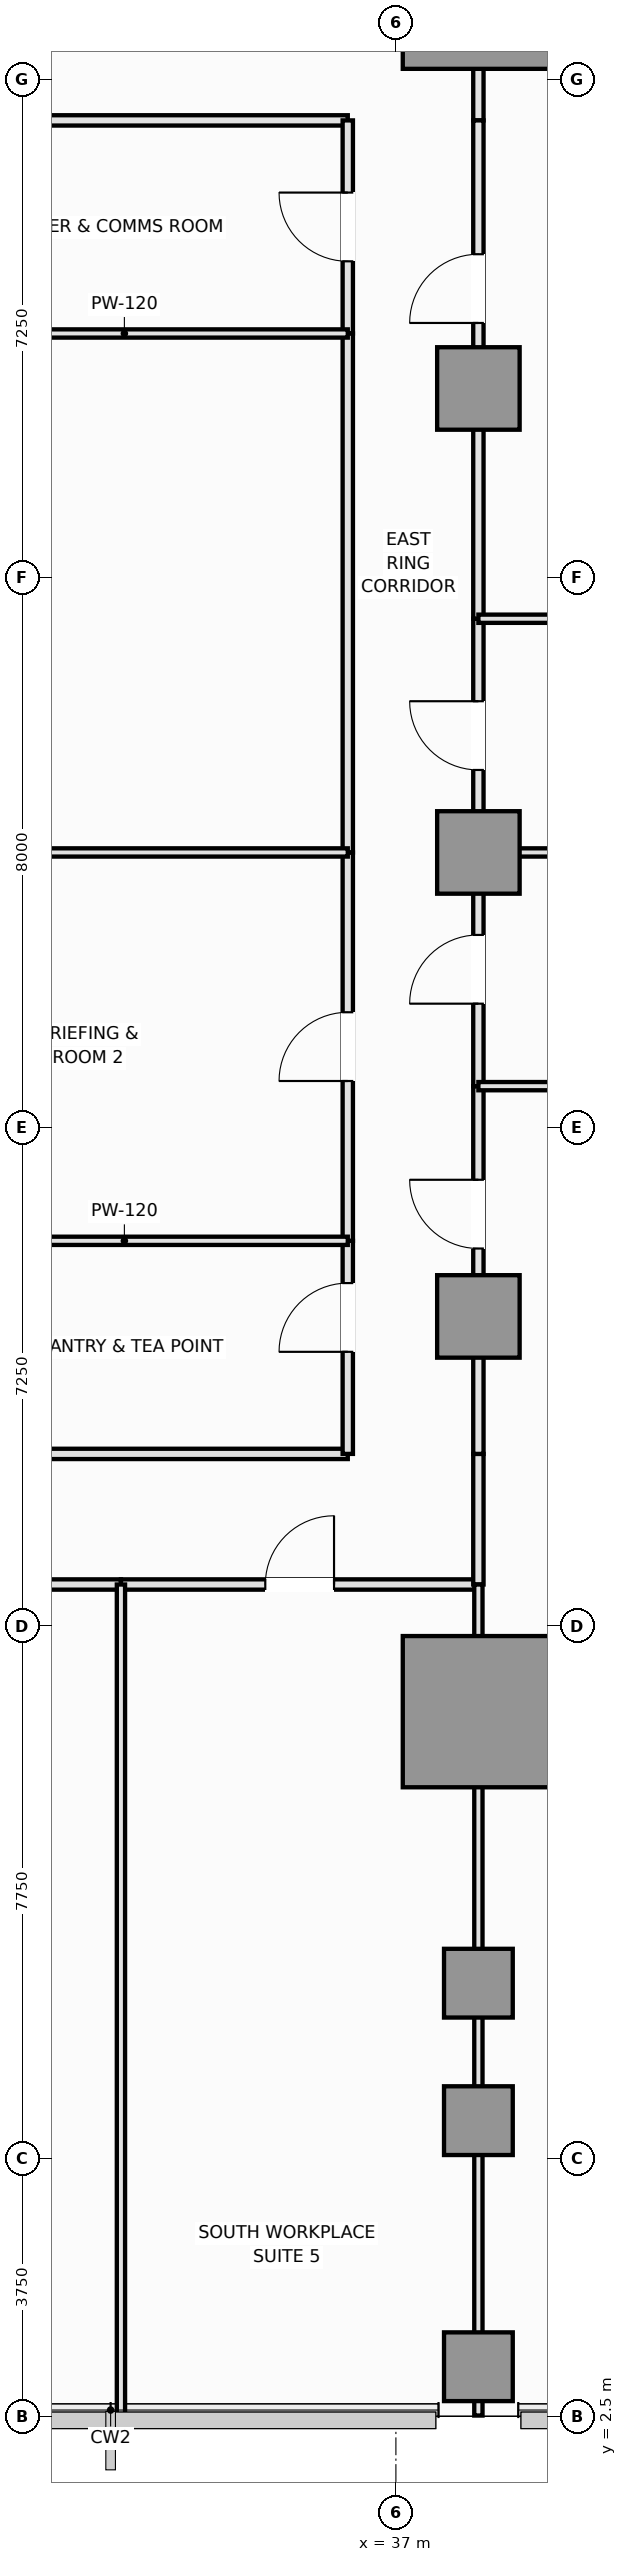
"""IFC4 building model, lengths in metres.
Left out: names, types, materials, properties, quantities, classifications, styles, units other than length and angle.
Written with IfcOpenShell. Run it as: python <this file> out.ifc"""

import sys

from ifc_helpers import new_model, si_unit, direction, frame, frame_2d, origin, origin_2d, place, context, subcontext, project, spatial, rectangle, extrude, element, fill, save


model = new_model("IFC4")
c1 = context("Model", 3, precision=1e-05, world=origin(), true_north=direction((0.0, 1.0)))
c2 = subcontext(c1, "Body", "Model", "MODEL_VIEW")
j1 = project(units=[si_unit("LENGTHUNIT", "METRE"), si_unit("PLANEANGLEUNIT", "RADIAN")], contexts=[c1])
p1 = place(None, origin())
s1 = spatial("IfcSite", under=j1, at=p1, CompositionType="ELEMENT")
p2 = place(p1, origin())
s2 = spatial("IfcBuilding", under=s1, at=p2, CompositionType="ELEMENT")
p3 = place(p2, frame((0.0, 0.0, 61.1)))
s3 = spatial("IfcBuildingStorey", under=s2, at=p3, CompositionType="ELEMENT", Elevation=61.1)
for number, where, z_axis, x_axis in (
    (1, (38.2, 12.75, 0.0), (0.0, 0.0, 1.0), (1.0, 0.0, 0.0)),
    (2, (38.2, 37.75, 0.0), (0.0, 0.0, 1.0), (1.0, 0.0, 0.0)),
):
    element("IfcColumn", number, at=place(p3, frame(where, z_axis=z_axis, x_axis=x_axis)), inside=s3, PredefinedType="COLUMN", context=c2, shape_type="SweptSolid", body=[
        extrude(rectangle(XDim=2.2, YDim=2.2, at=origin_2d()), origin(), (0.0, 0.0, 1.0), 3.55),
    ])
for number, where, z_axis, x_axis in (
    (3, (38.2, 18.5, 0.0), (0.0, 0.0, 1.0), (1.0, 0.0, 0.0)),
    (4, (38.2, 25.25, 0.0), (0.0, 0.0, 1.0), (1.0, 0.0, 0.0)),
    (5, (38.2, 32.0, 0.0), (0.0, 0.0, 1.0), (1.0, 0.0, 0.0)),
):
    element("IfcColumn", number, at=place(p3, frame(where, z_axis=z_axis, x_axis=x_axis)), inside=s3, PredefinedType="COLUMN", context=c2, shape_type="SweptSolid", body=[
        extrude(rectangle(XDim=1.2, YDim=1.2, at=origin_2d()), origin(), (0.0, 0.0, 1.0), 3.55),
    ])
for number, where, z_axis, x_axis in (
    (6, (38.2, 6.8, 0.0), (0.0, 0.0, 1.0), (1.0, 0.0, 0.0)),
    (7, (38.2, 8.8, 0.0), (0.0, 0.0, 1.0), (1.0, 0.0, 0.0)),
    (8, (38.2, 3.22, 0.0), (0.0, 0.0, 1.0), (1.0, 0.0, 0.0)),
):
    element("IfcColumn", number, at=place(p3, frame(where, z_axis=z_axis, x_axis=x_axis)), inside=s3, PredefinedType="COLUMN", context=c2, shape_type="SweptSolid", body=[
        extrude(rectangle(XDim=1.0, YDim=1.0, at=origin_2d()), origin(), (0.0, 0.0, 1.0), 3.55),
    ])
p4 = place(p3, frame((29.8, 16.5, 0.0), z_axis=(0.0, 0.0, 1.0), x_axis=(1.0, 0.0, 0.0)))
e9 = element("IfcWall", 9, at=p4, inside=s3, PredefinedType="PARTITIONING", context=c2, shape_type="SweptSolid", body=[
    extrude(rectangle(XDim=6.5, YDim=0.15, at=frame_2d((3.25, 0.0))), origin(), (0.0, 0.0, 1.0), 3.37),
])
p5 = place(p3, frame((27.5, 14.6, 0.0), z_axis=(0.0, 0.0, 1.0), x_axis=(1.0, 0.0, 0.0)))
e10 = element("IfcWall", 10, at=p5, inside=s3, PredefinedType="PARTITIONING", context=c2, shape_type="SweptSolid", body=[
    extrude(rectangle(XDim=5.5, YDim=0.15, at=frame_2d((2.75, 0.0))), origin(), (0.0, 0.0, 1.0), 3.37),
])
p6 = place(p5, frame((2.25, 0.0, 0.0)))
e11 = element("IfcOpeningElement", 11, at=p6, cuts=e10, PredefinedType="OPENING", context=c2, shape_type="SweptSolid", body=[
    extrude(rectangle(XDim=1.0, YDim=2.15, at=frame_2d((0.5, 1.075))), frame((0.0, 0.085, 0.0), z_axis=(0.0, -1.0, 0.0), x_axis=(1.0, 0.0, 0.0)), (0.0, 0.0, 1.0), 0.17),
])
p7 = place(p3, frame((33.0, 14.6, 0.0), z_axis=(0.0, 0.0, 1.0), x_axis=(1.0, 0.0, 0.0)))
e12 = element("IfcWall", 12, at=p7, inside=s3, PredefinedType="PARTITIONING", context=c2, shape_type="SweptSolid", body=[
    extrude(rectangle(XDim=5.2, YDim=0.15, at=frame_2d((2.6, 0.0))), origin(), (0.0, 0.0, 1.0), 3.37),
])
p8 = place(p7, frame((2.1, 0.0, 0.0)))
e13 = element("IfcOpeningElement", 13, at=p8, cuts=e12, PredefinedType="OPENING", context=c2, shape_type="SweptSolid", body=[
    extrude(rectangle(XDim=1.0, YDim=2.15, at=frame_2d((0.5, 1.075))), frame((0.0, 0.085, 0.0), z_axis=(0.0, -1.0, 0.0), x_axis=(1.0, 0.0, 0.0)), (0.0, 0.0, 1.0), 0.17),
])
p9 = place(p3, frame((38.2, 14.6, 0.0), z_axis=(0.0, 0.0, 1.0), x_axis=(0.0, 1.0, 0.0)))
e14 = element("IfcWall", 14, at=p9, inside=s3, PredefinedType="PARTITIONING", context=c2, shape_type="SweptSolid", body=[
    extrude(rectangle(XDim=1.9, YDim=0.15, at=frame_2d((0.95, 0.0))), origin(), (0.0, 0.0, 1.0), 2.82),
])
p10 = place(p3, frame((29.8, 35.9, 0.0), z_axis=(0.0, 0.0, 1.0), x_axis=(1.0, 0.0, 0.0)))
e15 = element("IfcWall", 15, at=p10, inside=s3, PredefinedType="PARTITIONING", context=c2, shape_type="SweptSolid", body=[
    extrude(rectangle(XDim=6.5, YDim=0.15, at=frame_2d((3.25, 0.0))), origin(), (0.0, 0.0, 1.0), 3.37),
])
p11 = place(p3, frame((38.2, 35.9, 0.0), z_axis=(0.0, 0.0, 1.0), x_axis=(0.0, 1.0, 0.0)))
e16 = element("IfcWall", 16, at=p11, inside=s3, PredefinedType="PARTITIONING", context=c2, shape_type="SweptSolid", body=[
    extrude(rectangle(XDim=1.9, YDim=0.15, at=frame_2d((0.95, 0.0))), origin(), (0.0, 0.0, 1.0), 2.82),
])
p12 = place(p3, frame((36.3, 16.5, 0.0), z_axis=(0.0, 0.0, 1.0), x_axis=(0.0, 1.0, 0.0)))
e17 = element("IfcWall", 17, at=p12, inside=s3, PredefinedType="PARTITIONING", context=c2, shape_type="SweptSolid", body=[
    extrude(rectangle(XDim=3.1, YDim=0.15, at=frame_2d((1.55, 0.0))), origin(), (0.0, 0.0, 1.0), 3.37),
])
p13 = place(p12, frame((1.485, 0.0, 0.0)))
e18 = element("IfcOpeningElement", 18, at=p13, cuts=e17, PredefinedType="OPENING", context=c2, shape_type="SweptSolid", body=[
    extrude(rectangle(XDim=1.0, YDim=2.15, at=frame_2d((0.5, 1.075))), frame((0.0, 0.085, 0.0), z_axis=(0.0, -1.0, 0.0), x_axis=(1.0, 0.0, 0.0)), (0.0, 0.0, 1.0), 0.17),
])
p14 = place(p3, frame((36.3, 32.8, 0.0), z_axis=(0.0, 0.0, 1.0), x_axis=(0.0, 1.0, 0.0)))
e19 = element("IfcWall", 19, at=p14, inside=s3, PredefinedType="PARTITIONING", context=c2, shape_type="SweptSolid", body=[
    extrude(rectangle(XDim=3.1, YDim=0.15, at=frame_2d((1.55, 0.0))), origin(), (0.0, 0.0, 1.0), 3.37),
])
p15 = place(p14, frame((1.05, 0.0, 0.0)))
e20 = element("IfcOpeningElement", 20, at=p15, cuts=e19, PredefinedType="OPENING", context=c2, shape_type="SweptSolid", body=[
    extrude(rectangle(XDim=1.0, YDim=2.15, at=frame_2d((0.5, 1.075))), frame((0.0, 0.085, 0.0), z_axis=(0.0, -1.0, 0.0), x_axis=(1.0, 0.0, 0.0)), (0.0, 0.0, 1.0), 0.17),
])
p16 = place(p3, frame((36.3, 19.6, 0.0), z_axis=(0.0, 0.0, 1.0), x_axis=(0.0, 1.0, 0.0)))
e21 = element("IfcWall", 21, at=p16, inside=s3, PredefinedType="PARTITIONING", context=c2, shape_type="SweptSolid", body=[
    extrude(rectangle(XDim=5.65, YDim=0.15, at=frame_2d((2.825, 0.0))), origin(), (0.0, 0.0, 1.0), 3.37),
])
p17 = place(p16, frame((2.325, 0.0, 0.0)))
e22 = element("IfcOpeningElement", 22, at=p17, cuts=e21, PredefinedType="OPENING", context=c2, shape_type="SweptSolid", body=[
    extrude(rectangle(XDim=1.0, YDim=2.15, at=frame_2d((0.5, 1.075))), frame((0.0, 0.085, 0.0), z_axis=(0.0, -1.0, 0.0), x_axis=(1.0, 0.0, 0.0)), (0.0, 0.0, 1.0), 0.17),
])
p18 = place(p3, frame((36.3, 25.25, 0.0), z_axis=(0.0, 0.0, 1.0), x_axis=(0.0, 1.0, 0.0)))
e23 = element("IfcWall", 23, at=p18, inside=s3, PredefinedType="PARTITIONING", context=c2, shape_type="SweptSolid", body=[
    extrude(rectangle(XDim=7.55, YDim=0.15, at=frame_2d((3.775, 0.0))), origin(), (0.0, 0.0, 1.0), 3.37),
])
p19 = place(p3, frame((38.2, 16.5, 0.0), z_axis=(0.0, 0.0, 1.0), x_axis=(0.0, 1.0, 0.0)))
e24 = element("IfcWall", 24, at=p19, inside=s3, PredefinedType="PARTITIONING", context=c2, shape_type="SweptSolid", body=[
    extrude(rectangle(XDim=5.35, YDim=0.15, at=frame_2d((2.675, 0.0))), origin(), (0.0, 0.0, 1.0), 2.82),
])
p20 = place(p19, frame((2.988, 0.0, 0.0)))
e25 = element("IfcOpeningElement", 25, at=p20, cuts=e24, PredefinedType="OPENING", context=c2, shape_type="SweptSolid", body=[
    extrude(rectangle(XDim=1.0, YDim=2.15, at=frame_2d((0.5, 1.075))), frame((0.0, 0.085, 0.0), z_axis=(0.0, -1.0, 0.0), x_axis=(1.0, 0.0, 0.0)), (0.0, 0.0, 1.0), 0.17),
])
p21 = place(p3, frame((38.2, 21.85, 0.0), z_axis=(0.0, 0.0, 1.0), x_axis=(0.0, 1.0, 0.0)))
e26 = element("IfcWall", 26, at=p21, inside=s3, PredefinedType="PARTITIONING", context=c2, shape_type="SweptSolid", body=[
    extrude(rectangle(XDim=3.4, YDim=0.15, at=frame_2d((1.7, 0.0))), origin(), (0.0, 0.0, 1.0), 2.82),
])
p22 = place(p21, frame((1.2, 0.0, 0.0)))
e27 = element("IfcOpeningElement", 27, at=p22, cuts=e26, PredefinedType="OPENING", context=c2, shape_type="SweptSolid", body=[
    extrude(rectangle(XDim=1.0, YDim=2.15, at=frame_2d((0.5, 1.075))), frame((0.0, 0.085, 0.0), z_axis=(0.0, -1.0, 0.0), x_axis=(1.0, 0.0, 0.0)), (0.0, 0.0, 1.0), 0.17),
])
p23 = place(p3, frame((38.2, 25.25, 0.0), z_axis=(0.0, 0.0, 1.0), x_axis=(0.0, 1.0, 0.0)))
e28 = element("IfcWall", 28, at=p23, inside=s3, PredefinedType="PARTITIONING", context=c2, shape_type="SweptSolid", body=[
    extrude(rectangle(XDim=3.4, YDim=0.15, at=frame_2d((1.7, 0.0))), origin(), (0.0, 0.0, 1.0), 2.82),
])
p24 = place(p23, frame((1.2, 0.0, 0.0)))
e29 = element("IfcOpeningElement", 29, at=p24, cuts=e28, PredefinedType="OPENING", context=c2, shape_type="SweptSolid", body=[
    extrude(rectangle(XDim=1.0, YDim=2.15, at=frame_2d((0.5, 1.075))), frame((0.0, 0.085, 0.0), z_axis=(0.0, -1.0, 0.0), x_axis=(1.0, 0.0, 0.0)), (0.0, 0.0, 1.0), 0.17),
])
p25 = place(p3, frame((38.2, 28.65, 0.0), z_axis=(0.0, 0.0, 1.0), x_axis=(0.0, 1.0, 0.0)))
e30 = element("IfcWall", 30, at=p25, inside=s3, PredefinedType="PARTITIONING", context=c2, shape_type="SweptSolid", body=[
    extrude(rectangle(XDim=7.25, YDim=0.15, at=frame_2d((3.625, 0.0))), origin(), (0.0, 0.0, 1.0), 2.82),
])
p26 = place(p25, frame((4.303, 0.0, 0.0)))
e31 = element("IfcOpeningElement", 31, at=p26, cuts=e30, PredefinedType="OPENING", context=c2, shape_type="SweptSolid", body=[
    extrude(rectangle(XDim=1.0, YDim=2.15, at=frame_2d((0.5, 1.075))), frame((0.0, 0.085, 0.0), z_axis=(0.0, -1.0, 0.0), x_axis=(1.0, 0.0, 0.0)), (0.0, 0.0, 1.0), 0.17),
])
for number, where, z_axis, x_axis in (
    (32, (29.8, 19.6, 0.0), (0.0, 0.0, 1.0), (1.0, 0.0, 0.0)),
    (33, (29.8, 32.8, 0.0), (0.0, 0.0, 1.0), (1.0, 0.0, 0.0)),
):
    element("IfcWall", number, at=place(p3, frame(where, z_axis=z_axis, x_axis=x_axis)), inside=s3, PredefinedType="PARTITIONING", context=c2, shape_type="SweptSolid", body=[
        extrude(rectangle(XDim=6.5, YDim=0.12, at=frame_2d((3.25, 0.0))), origin(), (0.0, 0.0, 1.0), 3.37),
    ])
p27 = place(p3, frame((27.5, 25.25, 0.0), z_axis=(0.0, 0.0, 1.0), x_axis=(1.0, 0.0, 0.0)))
e34 = element("IfcWall", 34, at=p27, inside=s3, PredefinedType="PARTITIONING", context=c2, shape_type="SweptSolid", body=[
    extrude(rectangle(XDim=8.8, YDim=0.12, at=frame_2d((4.4, 0.0))), origin(), (0.0, 0.0, 1.0), 2.72),
])
p28 = place(p3, frame((33.0, 2.51, 0.0), z_axis=(0.0, 0.0, 1.0), x_axis=(0.0, 1.0, 0.0)))
e35 = element("IfcWall", 35, at=p28, inside=s3, PredefinedType="PARTITIONING", context=c2, shape_type="SweptSolid", body=[
    extrude(rectangle(XDim=12.09, YDim=0.12, at=frame_2d((6.045, 0.0))), origin(), (0.0, 0.0, 1.0), 3.37),
])
p29 = place(p3, frame((38.2, 2.51, 0.0), z_axis=(0.0, 0.0, 1.0), x_axis=(0.0, 1.0, 0.0)))
e36 = element("IfcWall", 36, at=p29, inside=s3, PredefinedType="PARTITIONING", context=c2, shape_type="SweptSolid", body=[
    extrude(rectangle(XDim=12.09, YDim=0.12, at=frame_2d((6.045, 0.0))), origin(), (0.0, 0.0, 1.0), 2.82),
])
p30 = place(p3, frame((38.2, 21.85, 0.0), z_axis=(0.0, 0.0, 1.0), x_axis=(1.0, 0.0, 0.0)))
e37 = element("IfcWall", 37, at=p30, inside=s3, PredefinedType="PARTITIONING", context=c2, shape_type="SweptSolid", body=[
    extrude(rectangle(XDim=15.29, YDim=0.12, at=frame_2d((7.645, 0.0))), origin(), (0.0, 0.0, 1.0), 3.37),
])
p31 = place(p3, frame((38.2, 25.25, 0.0), z_axis=(0.0, 0.0, 1.0), x_axis=(1.0, 0.0, 0.0)))
e38 = element("IfcWall", 38, at=p31, inside=s3, PredefinedType="PARTITIONING", context=c2, shape_type="SweptSolid", body=[
    extrude(rectangle(XDim=15.29, YDim=0.12, at=frame_2d((7.645, 0.0))), origin(), (0.0, 0.0, 1.0), 2.72),
])
p32 = place(p3, frame((38.2, 28.65, 0.0), z_axis=(0.0, 0.0, 1.0), x_axis=(1.0, 0.0, 0.0)))
e39 = element("IfcWall", 39, at=p32, inside=s3, PredefinedType="PARTITIONING", context=c2, shape_type="SweptSolid", body=[
    extrude(rectangle(XDim=15.29, YDim=0.12, at=frame_2d((7.645, 0.0))), origin(), (0.0, 0.0, 1.0), 3.37),
])
p33 = place(p8, origin())
e40 = element("IfcDoor", 40, at=p33, inside=s3, OperationType="SINGLE_SWING_RIGHT", PredefinedType="DOOR", context=c2, shape_type="SweptSolid", body=[
    extrude(rectangle(XDim=1.0, YDim=2.15, at=frame_2d((0.5, 1.075))), frame((0.0, 0.025, 0.0), z_axis=(0.0, -1.0, 0.0), x_axis=(1.0, 0.0, 0.0)), (0.0, 0.0, 1.0), 0.05),
])
fill(e13, e40)
p34 = place(p13, origin())
e41 = element("IfcDoor", 41, at=p34, inside=s3, OperationType="SINGLE_SWING_LEFT", PredefinedType="DOOR", context=c2, shape_type="SweptSolid", body=[
    extrude(rectangle(XDim=1.0, YDim=2.15, at=frame_2d((0.5, 1.075))), frame((0.0, 0.025, 0.0), z_axis=(0.0, -1.0, 0.0), x_axis=(1.0, 0.0, 0.0)), (0.0, 0.0, 1.0), 0.05),
])
fill(e18, e41)
p35 = place(p15, origin())
e42 = element("IfcDoor", 42, at=p35, inside=s3, OperationType="SINGLE_SWING_RIGHT", PredefinedType="DOOR", context=c2, shape_type="SweptSolid", body=[
    extrude(rectangle(XDim=1.0, YDim=2.15, at=frame_2d((0.5, 1.075))), frame((0.0, 0.025, 0.0), z_axis=(0.0, -1.0, 0.0), x_axis=(1.0, 0.0, 0.0)), (0.0, 0.0, 1.0), 0.05),
])
fill(e20, e42)
p36 = place(p17, origin())
e43 = element("IfcDoor", 43, at=p36, inside=s3, OperationType="SINGLE_SWING_LEFT", PredefinedType="DOOR", context=c2, shape_type="SweptSolid", body=[
    extrude(rectangle(XDim=1.0, YDim=2.15, at=frame_2d((0.5, 1.075))), frame((0.0, 0.025, 0.0), z_axis=(0.0, -1.0, 0.0), x_axis=(1.0, 0.0, 0.0)), (0.0, 0.0, 1.0), 0.05),
])
fill(e22, e43)
p37 = place(p20, origin())
e44 = element("IfcDoor", 44, at=p37, inside=s3, OperationType="SINGLE_SWING_RIGHT", PredefinedType="DOOR", context=c2, shape_type="SweptSolid", body=[
    extrude(rectangle(XDim=1.0, YDim=2.15, at=frame_2d((0.5, 1.075))), frame((0.0, 0.025, 0.0), z_axis=(0.0, -1.0, 0.0), x_axis=(1.0, 0.0, 0.0)), (0.0, 0.0, 1.0), 0.05),
])
fill(e25, e44)
p38 = place(p22, origin())
e45 = element("IfcDoor", 45, at=p38, inside=s3, OperationType="SINGLE_SWING_LEFT", PredefinedType="DOOR", context=c2, shape_type="SweptSolid", body=[
    extrude(rectangle(XDim=1.0, YDim=2.15, at=frame_2d((0.5, 1.075))), frame((0.0, 0.025, 0.0), z_axis=(0.0, -1.0, 0.0), x_axis=(1.0, 0.0, 0.0)), (0.0, 0.0, 1.0), 0.05),
])
fill(e27, e45)
p39 = place(p24, origin())
e46 = element("IfcDoor", 46, at=p39, inside=s3, OperationType="SINGLE_SWING_RIGHT", PredefinedType="DOOR", context=c2, shape_type="SweptSolid", body=[
    extrude(rectangle(XDim=1.0, YDim=2.15, at=frame_2d((0.5, 1.075))), frame((0.0, 0.025, 0.0), z_axis=(0.0, -1.0, 0.0), x_axis=(1.0, 0.0, 0.0)), (0.0, 0.0, 1.0), 0.05),
])
fill(e29, e46)
p40 = place(p26, origin())
e47 = element("IfcDoor", 47, at=p40, inside=s3, OperationType="SINGLE_SWING_LEFT", PredefinedType="DOOR", context=c2, shape_type="SweptSolid", body=[
    extrude(rectangle(XDim=1.0, YDim=2.15, at=frame_2d((0.5, 1.075))), frame((0.0, 0.025, 0.0), z_axis=(0.0, -1.0, 0.0), x_axis=(1.0, 0.0, 0.0)), (0.0, 0.0, 1.0), 0.05),
])
fill(e31, e47)
save(model, sys.argv[1])
